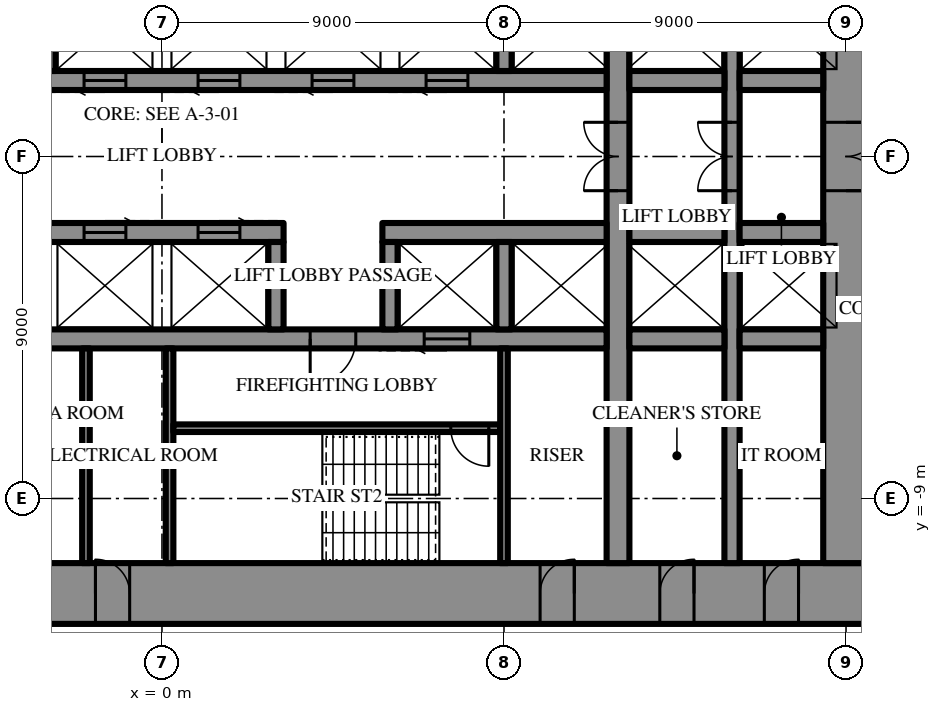
"""IFC4 building model, lengths in metres.
Left out: names, types, materials, properties, quantities, classifications, styles, units other than length and angle.
Written with IfcOpenShell. Run it as: python <this file> out.ifc"""

import sys

from ifc_helpers import new_model, si_unit, direction, frame, frame_2d, origin, place, context, subcontext, project, spatial, rectangle, extrude, element, fill, save


model = new_model("IFC4")
c1 = context("Model", 3, precision=1e-05, world=origin(), true_north=direction((0.0, 1.0)))
c2 = subcontext(c1, "Body", "Model", "MODEL_VIEW")
j1 = project(units=[si_unit("LENGTHUNIT", "METRE"), si_unit("PLANEANGLEUNIT", "RADIAN")], contexts=[c1])
p1 = place(None, origin())
s1 = spatial("IfcSite", under=j1, at=p1, CompositionType="ELEMENT")
p2 = place(p1, origin())
s2 = spatial("IfcBuilding", under=s1, at=p2, CompositionType="ELEMENT")
p3 = place(p2, frame((0.0, 0.0, 78.1)))
s3 = spatial("IfcBuildingStorey", under=s2, at=p3, CompositionType="ELEMENT", Elevation=78.1)
p4 = place(p3, frame((18.6, -11.5, 0.0), z_axis=(0.0, 0.0, 1.0), x_axis=(-1.0, 0.0, 0.0)))
e1 = element("IfcWall", 1, at=p4, inside=s3, PredefinedType="SHEAR", context=c2, shape_type="SweptSolid", body=[
    extrude(rectangle(XDim=37.2, YDim=1.6, at=frame_2d((18.6, 0.0))), origin(), (0.0, 0.0, 1.0), 4.2),
])
p5 = place(p4, frame((19.45, 0.0, 0.0)))
e2 = element("IfcOpeningElement", 2, at=p5, cuts=e1, PredefinedType="OPENING", context=c2, shape_type="SweptSolid", body=[
    extrude(rectangle(XDim=0.9, YDim=2.2, at=frame_2d((0.45, 1.1))), frame((0.0, 0.81, 0.0), z_axis=(0.0, -1.0, 0.0), x_axis=(1.0, 0.0, 0.0)), (0.0, 0.0, 1.0), 1.62),
])
p6 = place(p4, frame((22.45, 0.0, 0.0)))
e3 = element("IfcOpeningElement", 3, at=p6, cuts=e1, PredefinedType="OPENING", context=c2, shape_type="SweptSolid", body=[
    extrude(rectangle(XDim=0.9, YDim=2.2, at=frame_2d((0.45, 1.1))), frame((0.0, 0.81, 0.0), z_axis=(0.0, -1.0, 0.0), x_axis=(1.0, 0.0, 0.0)), (0.0, 0.0, 1.0), 1.62),
])
p7 = place(p4, frame((25.5, 0.0, 0.0)))
e4 = element("IfcOpeningElement", 4, at=p7, cuts=e1, PredefinedType="OPENING", context=c2, shape_type="SweptSolid", body=[
    extrude(rectangle(XDim=1.0, YDim=2.2, at=frame_2d((0.5, 1.1))), frame((0.0, 0.81, 0.0), z_axis=(0.0, -1.0, 0.0), x_axis=(1.0, 0.0, 0.0)), (0.0, 0.0, 1.0), 1.62),
])
p8 = place(p4, frame((1.85, 0.0, 0.0)))
e5 = element("IfcOpeningElement", 5, at=p8, cuts=e1, PredefinedType="OPENING", context=c2, shape_type="SweptSolid", body=[
    extrude(rectangle(XDim=0.9, YDim=2.2, at=frame_2d((0.45, 1.1))), frame((0.0, 0.81, 0.0), z_axis=(0.0, -1.0, 0.0), x_axis=(1.0, 0.0, 0.0)), (0.0, 0.0, 1.0), 1.62),
])
p9 = place(p4, frame((4.6, 0.0, 0.0)))
e6 = element("IfcOpeningElement", 6, at=p9, cuts=e1, PredefinedType="OPENING", context=c2, shape_type="SweptSolid", body=[
    extrude(rectangle(XDim=0.9, YDim=2.2, at=frame_2d((0.45, 1.1))), frame((0.0, 0.81, 0.0), z_axis=(0.0, -1.0, 0.0), x_axis=(1.0, 0.0, 0.0)), (0.0, 0.0, 1.0), 1.62),
])
p10 = place(p4, frame((7.75, 0.0, 0.0)))
e7 = element("IfcOpeningElement", 7, at=p10, cuts=e1, PredefinedType="OPENING", context=c2, shape_type="SweptSolid", body=[
    extrude(rectangle(XDim=0.9, YDim=2.2, at=frame_2d((0.45, 1.1))), frame((0.0, 0.81, 0.0), z_axis=(0.0, -1.0, 0.0), x_axis=(1.0, 0.0, 0.0)), (0.0, 0.0, 1.0), 1.62),
])
p11 = place(p4, frame((28.55, 0.0, 0.0)))
e8 = element("IfcOpeningElement", 8, at=p11, cuts=e1, PredefinedType="OPENING", context=c2, shape_type="SweptSolid", body=[
    extrude(rectangle(XDim=0.9, YDim=2.2, at=frame_2d((0.45, 1.1))), frame((0.0, 0.81, 0.0), z_axis=(0.0, -1.0, 0.0), x_axis=(1.0, 0.0, 0.0)), (0.0, 0.0, 1.0), 1.62),
])
p12 = place(p4, frame((31.7, 0.0, 0.0)))
e9 = element("IfcOpeningElement", 9, at=p12, cuts=e1, PredefinedType="OPENING", context=c2, shape_type="SweptSolid", body=[
    extrude(rectangle(XDim=0.9, YDim=2.2, at=frame_2d((0.45, 1.1))), frame((0.0, 0.81, 0.0), z_axis=(0.0, -1.0, 0.0), x_axis=(1.0, 0.0, 0.0)), (0.0, 0.0, 1.0), 1.62),
])
p13 = place(p4, frame((34.45, 0.0, 0.0)))
e10 = element("IfcOpeningElement", 10, at=p13, cuts=e1, PredefinedType="OPENING", context=c2, shape_type="SweptSolid", body=[
    extrude(rectangle(XDim=0.9, YDim=2.2, at=frame_2d((0.45, 1.1))), frame((0.0, 0.81, 0.0), z_axis=(0.0, -1.0, 0.0), x_axis=(1.0, 0.0, 0.0)), (0.0, 0.0, 1.0), 1.62),
])
p14 = place(p3, frame((18.0, -10.7, 0.0), z_axis=(0.0, 0.0, 1.0), x_axis=(0.0, 1.0, 0.0)))
e11 = element("IfcWall", 11, at=p14, inside=s3, PredefinedType="SHEAR", context=c2, shape_type="SweptSolid", body=[
    extrude(rectangle(XDim=21.4, YDim=1.2, at=frame_2d((10.7, 0.0))), origin(), (0.0, 0.0, 1.0), 4.2),
])
p15 = place(p14, frame((9.8, 0.0, 0.0)))
e12 = element("IfcOpeningElement", 12, at=p15, cuts=e11, PredefinedType="OPENING", context=c2, shape_type="SweptSolid", body=[
    extrude(rectangle(XDim=1.8, YDim=2.4, at=frame_2d((0.9, 1.2))), frame((0.0, 0.61, 0.0), z_axis=(0.0, -1.0, 0.0), x_axis=(1.0, 0.0, 0.0)), (0.0, 0.0, 1.0), 1.22),
])
p16 = place(p3, frame((12.0, -10.7, 0.0), z_axis=(0.0, 0.0, 1.0), x_axis=(0.0, 1.0, 0.0)))
e13 = element("IfcWall", 13, at=p16, inside=s3, PredefinedType="SHEAR", context=c2, shape_type="SweptSolid", body=[
    extrude(rectangle(XDim=21.4, YDim=0.6, at=frame_2d((10.7, 0.0))), origin(), (0.0, 0.0, 1.0), 4.2),
])
p17 = place(p16, frame((9.8, 0.0, 0.0)))
e14 = element("IfcOpeningElement", 14, at=p17, cuts=e13, PredefinedType="OPENING", context=c2, shape_type="SweptSolid", body=[
    extrude(rectangle(XDim=1.8, YDim=2.4, at=frame_2d((0.9, 1.2))), frame((0.0, 0.31, 0.0), z_axis=(0.0, -1.0, 0.0), x_axis=(1.0, 0.0, 0.0)), (0.0, 0.0, 1.0), 0.62),
])
p18 = place(p3, frame((15.0, -10.7, 0.0), z_axis=(0.0, 0.0, 1.0), x_axis=(0.0, 1.0, 0.0)))
e15 = element("IfcWall", 15, at=p18, inside=s3, PredefinedType="SHEAR", context=c2, shape_type="SweptSolid", body=[
    extrude(rectangle(XDim=21.4, YDim=0.4, at=frame_2d((10.7, 0.0))), origin(), (0.0, 0.0, 1.0), 4.2),
])
p19 = place(p18, frame((9.8, 0.0, 0.0)))
e16 = element("IfcOpeningElement", 16, at=p19, cuts=e15, PredefinedType="OPENING", context=c2, shape_type="SweptSolid", body=[
    extrude(rectangle(XDim=1.8, YDim=2.4, at=frame_2d((0.9, 1.2))), frame((0.0, 0.21, 0.0), z_axis=(0.0, -1.0, 0.0), x_axis=(1.0, 0.0, 0.0)), (0.0, 0.0, 1.0), 0.42),
])
p20 = place(p3, frame((-3.2, 2.0, 0.0), z_axis=(0.0, 0.0, 1.0), x_axis=(1.0, 0.0, 0.0)))
e17 = element("IfcWall", 17, at=p20, inside=s3, PredefinedType="SHEAR", context=c2, shape_type="SweptSolid", body=[
    extrude(rectangle(XDim=14.9, YDim=0.5, at=frame_2d((7.45, 0.0))), origin(), (0.0, 0.0, 1.0), 4.2),
])
p21 = place(p20, frame((1.15, 0.0, 0.0)))
e18 = element("IfcOpeningElement", 18, at=p21, cuts=e17, PredefinedType="OPENING", context=c2, shape_type="SweptSolid", body=[
    extrude(rectangle(XDim=1.1, YDim=2.2, at=frame_2d((0.55, 1.1))), frame((0.0, 0.26, 0.0), z_axis=(0.0, -1.0, 0.0), x_axis=(1.0, 0.0, 0.0)), (0.0, 0.0, 1.0), 0.52),
])
p22 = place(p20, frame((4.15, 0.0, 0.0)))
e19 = element("IfcOpeningElement", 19, at=p22, cuts=e17, PredefinedType="OPENING", context=c2, shape_type="SweptSolid", body=[
    extrude(rectangle(XDim=1.1, YDim=2.2, at=frame_2d((0.55, 1.1))), frame((0.0, 0.26, 0.0), z_axis=(0.0, -1.0, 0.0), x_axis=(1.0, 0.0, 0.0)), (0.0, 0.0, 1.0), 0.52),
])
p23 = place(p20, frame((7.15, 0.0, 0.0)))
e20 = element("IfcOpeningElement", 20, at=p23, cuts=e17, PredefinedType="OPENING", context=c2, shape_type="SweptSolid", body=[
    extrude(rectangle(XDim=1.1, YDim=2.2, at=frame_2d((0.55, 1.1))), frame((0.0, 0.26, 0.0), z_axis=(0.0, -1.0, 0.0), x_axis=(1.0, 0.0, 0.0)), (0.0, 0.0, 1.0), 0.52),
])
p24 = place(p20, frame((10.15, 0.0, 0.0)))
e21 = element("IfcOpeningElement", 21, at=p24, cuts=e17, PredefinedType="OPENING", context=c2, shape_type="SweptSolid", body=[
    extrude(rectangle(XDim=1.1, YDim=2.2, at=frame_2d((0.55, 1.1))), frame((0.0, 0.26, 0.0), z_axis=(0.0, -1.0, 0.0), x_axis=(1.0, 0.0, 0.0)), (0.0, 0.0, 1.0), 0.52),
])
p25 = place(p3, frame((12.3, 2.0, 0.0), z_axis=(0.0, 0.0, 1.0), x_axis=(1.0, 0.0, 0.0)))
e22 = element("IfcWall", 22, at=p25, inside=s3, PredefinedType="SHEAR", context=c2, shape_type="SweptSolid", body=[
    extrude(rectangle(XDim=2.5, YDim=0.5, at=frame_2d((1.25, 0.0))), origin(), (0.0, 0.0, 1.0), 4.2),
])
p26 = place(p3, frame((15.2, 2.0, 0.0), z_axis=(0.0, 0.0, 1.0), x_axis=(1.0, 0.0, 0.0)))
e23 = element("IfcWall", 23, at=p26, inside=s3, PredefinedType="SHEAR", context=c2, shape_type="SweptSolid", body=[
    extrude(rectangle(XDim=2.2, YDim=0.5, at=frame_2d((1.1, 0.0))), origin(), (0.0, 0.0, 1.0), 4.2),
])
for number, where, z_axis, x_axis in (
    (24, (-3.0, 2.25, 0.0), (0.0, 0.0, 1.0), (0.0, 1.0, 0.0)),
    (25, (9.0, 2.25, 0.0), (0.0, 0.0, 1.0), (0.0, 1.0, 0.0)),
):
    element("IfcWall", number, at=place(p3, frame(where, z_axis=z_axis, x_axis=x_axis)), inside=s3, PredefinedType="SHEAR", context=c2, shape_type="SweptSolid", body=[
        extrude(rectangle(XDim=2.3, YDim=0.4, at=frame_2d((1.15, 0.0))), origin(), (0.0, 0.0, 1.0), 4.2),
    ])
p27 = place(p3, frame((17.4, -2.0, 0.0), z_axis=(0.0, 0.0, 1.0), x_axis=(-1.0, 0.0, 0.0)))
e26 = element("IfcWall", 26, at=p27, inside=s3, PredefinedType="SHEAR", context=c2, shape_type="SweptSolid", body=[
    extrude(rectangle(XDim=2.2, YDim=0.5, at=frame_2d((1.1, 0.0))), origin(), (0.0, 0.0, 1.0), 4.2),
])
p28 = place(p3, frame((14.8, -2.0, 0.0), z_axis=(0.0, 0.0, 1.0), x_axis=(-1.0, 0.0, 0.0)))
e27 = element("IfcWall", 27, at=p28, inside=s3, PredefinedType="SHEAR", context=c2, shape_type="SweptSolid", body=[
    extrude(rectangle(XDim=2.5, YDim=0.5, at=frame_2d((1.25, 0.0))), origin(), (0.0, 0.0, 1.0), 4.2),
])
p29 = place(p3, frame((11.7, -2.0, 0.0), z_axis=(0.0, 0.0, 1.0), x_axis=(-1.0, 0.0, 0.0)))
e28 = element("IfcWall", 28, at=p29, inside=s3, PredefinedType="SHEAR", context=c2, shape_type="SweptSolid", body=[
    extrude(rectangle(XDim=5.9, YDim=0.5, at=frame_2d((2.95, 0.0))), origin(), (0.0, 0.0, 1.0), 4.2),
])
p30 = place(p3, frame((3.2, -2.0, 0.0), z_axis=(0.0, 0.0, 1.0), x_axis=(-1.0, 0.0, 0.0)))
e29 = element("IfcWall", 29, at=p30, inside=s3, PredefinedType="SHEAR", context=c2, shape_type="SweptSolid", body=[
    extrude(rectangle(XDim=14.9, YDim=0.5, at=frame_2d((7.45, 0.0))), origin(), (0.0, 0.0, 1.0), 4.2),
])
p31 = place(p30, frame((1.15, 0.0, 0.0)))
e30 = element("IfcOpeningElement", 30, at=p31, cuts=e29, PredefinedType="OPENING", context=c2, shape_type="SweptSolid", body=[
    extrude(rectangle(XDim=1.1, YDim=2.2, at=frame_2d((0.55, 1.1))), frame((0.0, 0.26, 0.0), z_axis=(0.0, -1.0, 0.0), x_axis=(1.0, 0.0, 0.0)), (0.0, 0.0, 1.0), 0.52),
])
p32 = place(p30, frame((4.15, 0.0, 0.0)))
e31 = element("IfcOpeningElement", 31, at=p32, cuts=e29, PredefinedType="OPENING", context=c2, shape_type="SweptSolid", body=[
    extrude(rectangle(XDim=1.1, YDim=2.2, at=frame_2d((0.55, 1.1))), frame((0.0, 0.26, 0.0), z_axis=(0.0, -1.0, 0.0), x_axis=(1.0, 0.0, 0.0)), (0.0, 0.0, 1.0), 0.52),
])
p33 = place(p30, frame((7.15, 0.0, 0.0)))
e32 = element("IfcOpeningElement", 32, at=p33, cuts=e29, PredefinedType="OPENING", context=c2, shape_type="SweptSolid", body=[
    extrude(rectangle(XDim=1.1, YDim=2.2, at=frame_2d((0.55, 1.1))), frame((0.0, 0.26, 0.0), z_axis=(0.0, -1.0, 0.0), x_axis=(1.0, 0.0, 0.0)), (0.0, 0.0, 1.0), 0.52),
])
p34 = place(p30, frame((10.15, 0.0, 0.0)))
e33 = element("IfcOpeningElement", 33, at=p34, cuts=e29, PredefinedType="OPENING", context=c2, shape_type="SweptSolid", body=[
    extrude(rectangle(XDim=1.1, YDim=2.2, at=frame_2d((0.55, 1.1))), frame((0.0, 0.26, 0.0), z_axis=(0.0, -1.0, 0.0), x_axis=(1.0, 0.0, 0.0)), (0.0, 0.0, 1.0), 0.52),
])
p35 = place(p3, frame((17.4, -4.8, 0.0), z_axis=(0.0, 0.0, 1.0), x_axis=(-1.0, 0.0, 0.0)))
e34 = element("IfcWall", 34, at=p35, inside=s3, PredefinedType="SHEAR", context=c2, shape_type="SweptSolid", body=[
    extrude(rectangle(XDim=2.2, YDim=0.5, at=frame_2d((1.1, 0.0))), origin(), (0.0, 0.0, 1.0), 4.2),
])
p36 = place(p3, frame((14.8, -4.8, 0.0), z_axis=(0.0, 0.0, 1.0), x_axis=(-1.0, 0.0, 0.0)))
e35 = element("IfcWall", 35, at=p36, inside=s3, PredefinedType="SHEAR", context=c2, shape_type="SweptSolid", body=[
    extrude(rectangle(XDim=2.5, YDim=0.5, at=frame_2d((1.25, 0.0))), origin(), (0.0, 0.0, 1.0), 4.2),
])
p37 = place(p3, frame((11.7, -4.8, 0.0), z_axis=(0.0, 0.0, 1.0), x_axis=(-1.0, 0.0, 0.0)))
e36 = element("IfcWall", 36, at=p37, inside=s3, PredefinedType="SHEAR", context=c2, shape_type="SweptSolid", body=[
    extrude(rectangle(XDim=23.4, YDim=0.5, at=frame_2d((11.7, 0.0))), origin(), (0.0, 0.0, 1.0), 4.2),
])
p38 = place(p37, frame((6.6, 0.0, 0.0)))
e37 = element("IfcOpeningElement", 37, at=p38, cuts=e36, PredefinedType="OPENING", context=c2, shape_type="SweptSolid", body=[
    extrude(rectangle(XDim=1.2, YDim=2.2, at=frame_2d((0.6, 1.1))), frame((0.0, 0.26, 0.0), z_axis=(0.0, -1.0, 0.0), x_axis=(1.0, 0.0, 0.0)), (0.0, 0.0, 1.0), 0.52),
])
p39 = place(p37, frame((3.6, 0.0, 0.0)))
e38 = element("IfcOpeningElement", 38, at=p39, cuts=e36, PredefinedType="OPENING", context=c2, shape_type="SweptSolid", body=[
    extrude(rectangle(XDim=1.2, YDim=2.2, at=frame_2d((0.6, 1.1))), frame((0.0, 0.26, 0.0), z_axis=(0.0, -1.0, 0.0), x_axis=(1.0, 0.0, 0.0)), (0.0, 0.0, 1.0), 0.52),
])
for number, where, z_axis, x_axis in (
    (39, (9.0, -2.25, 0.0), (0.0, 0.0, 1.0), (0.0, -1.0, 0.0)),
    (40, (6.0, -2.25, 0.0), (0.0, 0.0, 1.0), (0.0, -1.0, 0.0)),
    (41, (3.0, -2.25, 0.0), (0.0, 0.0, 1.0), (0.0, -1.0, 0.0)),
):
    element("IfcWall", number, at=place(p3, frame(where, z_axis=z_axis, x_axis=x_axis)), inside=s3, PredefinedType="SHEAR", context=c2, shape_type="SweptSolid", body=[
        extrude(rectangle(XDim=2.3, YDim=0.4, at=frame_2d((1.15, 0.0))), origin(), (0.0, 0.0, 1.0), 4.2),
    ])
p40 = place(p3, frame((0.2, -5.05, 0.0), z_axis=(0.0, 0.0, 1.0), x_axis=(0.0, -1.0, 0.0)))
e42 = element("IfcWall", 42, at=p40, inside=s3, PredefinedType="SHEAR", context=c2, shape_type="SweptSolid", body=[
    extrude(rectangle(XDim=5.65, YDim=0.2, at=frame_2d((2.825, 0.0))), origin(), (0.0, 0.0, 1.0), 4.2),
])
p41 = place(p3, frame((8.9, -7.15, 0.0), z_axis=(0.0, 0.0, 1.0), x_axis=(-1.0, 0.0, 0.0)))
e43 = element("IfcWall", 43, at=p41, inside=s3, PredefinedType="SHEAR", context=c2, shape_type="SweptSolid", body=[
    extrude(rectangle(XDim=8.6, YDim=0.2, at=frame_2d((4.3, 0.0))), origin(), (0.0, 0.0, 1.0), 4.2),
])
p42 = place(p41, frame((0.3, 0.0, 0.0)))
e44 = element("IfcOpeningElement", 44, at=p42, cuts=e43, PredefinedType="OPENING", context=c2, shape_type="SweptSolid", body=[
    extrude(rectangle(XDim=1.0, YDim=2.2, at=frame_2d((0.5, 1.1))), frame((0.0, 0.11, 0.0), z_axis=(0.0, -1.0, 0.0), x_axis=(1.0, 0.0, 0.0)), (0.0, 0.0, 1.0), 0.22),
])
for number, where, z_axis, x_axis in (
    (45, (9.0, -5.05, 0.0), (0.0, 0.0, 1.0), (0.0, -1.0, 0.0)),
    (46, (-2.0, -5.05, 0.0), (0.0, 0.0, 1.0), (0.0, -1.0, 0.0)),
):
    element("IfcWall", number, at=place(p3, frame(where, z_axis=z_axis, x_axis=x_axis)), inside=s3, PredefinedType="PARTITIONING", context=c2, shape_type="SweptSolid", body=[
        extrude(rectangle(XDim=5.65, YDim=0.2, at=frame_2d((2.825, 0.0))), origin(), (0.0, 0.0, 1.0), 4.0),
    ])
p43 = place(p15, frame((1.8, 0.0, 0.0), z_axis=(0.0, 0.0, 1.0), x_axis=(-1.0, 0.0, 0.0)))
e47 = element("IfcDoor", 47, at=p43, inside=s3, OperationType="DOUBLE_DOOR_SINGLE_SWING", PredefinedType="DOOR", context=c2, shape_type="SweptSolid", body=[
    extrude(rectangle(XDim=1.8, YDim=2.4, at=frame_2d((0.9, 1.2))), frame((0.0, 0.025, 0.0), z_axis=(0.0, -1.0, 0.0), x_axis=(1.0, 0.0, 0.0)), (0.0, 0.0, 1.0), 0.05),
])
fill(e12, e47)
p44 = place(p38, origin())
e48 = element("IfcDoor", 48, at=p44, inside=s3, OperationType="SINGLE_SWING_LEFT", PredefinedType="DOOR", context=c2, shape_type="SweptSolid", body=[
    extrude(rectangle(XDim=1.2, YDim=2.2, at=frame_2d((0.6, 1.1))), frame((0.0, 0.025, 0.0), z_axis=(0.0, -1.0, 0.0), x_axis=(1.0, 0.0, 0.0)), (0.0, 0.0, 1.0), 0.05),
])
fill(e37, e48)
p45 = place(p42, origin())
e49 = element("IfcDoor", 49, at=p45, inside=s3, OperationType="SINGLE_SWING_RIGHT", PredefinedType="DOOR", context=c2, shape_type="SweptSolid", body=[
    extrude(rectangle(XDim=1.0, YDim=2.2, at=frame_2d((0.5, 1.1))), frame((0.0, 0.025, 0.0), z_axis=(0.0, -1.0, 0.0), x_axis=(1.0, 0.0, 0.0)), (0.0, 0.0, 1.0), 0.05),
])
fill(e44, e49)
p46 = place(p5, frame((0.9, 0.0, 0.0), z_axis=(0.0, 0.0, 1.0), x_axis=(-1.0, 0.0, 0.0)))
e50 = element("IfcDoor", 50, at=p46, inside=s3, OperationType="SINGLE_SWING_RIGHT", PredefinedType="DOOR", context=c2, shape_type="SweptSolid", body=[
    extrude(rectangle(XDim=0.9, YDim=2.2, at=frame_2d((0.45, 1.1))), frame((0.0, 0.025, 0.0), z_axis=(0.0, -1.0, 0.0), x_axis=(1.0, 0.0, 0.0)), (0.0, 0.0, 1.0), 0.05),
])
fill(e2, e50)
p47 = place(p8, frame((0.9, 0.0, 0.0), z_axis=(0.0, 0.0, 1.0), x_axis=(-1.0, 0.0, 0.0)))
e51 = element("IfcDoor", 51, at=p47, inside=s3, OperationType="SINGLE_SWING_LEFT", PredefinedType="DOOR", context=c2, shape_type="SweptSolid", body=[
    extrude(rectangle(XDim=0.9, YDim=2.2, at=frame_2d((0.45, 1.1))), frame((0.0, 0.025, 0.0), z_axis=(0.0, -1.0, 0.0), x_axis=(1.0, 0.0, 0.0)), (0.0, 0.0, 1.0), 0.05),
])
fill(e5, e51)
p48 = place(p9, frame((0.9, 0.0, 0.0), z_axis=(0.0, 0.0, 1.0), x_axis=(-1.0, 0.0, 0.0)))
e52 = element("IfcDoor", 52, at=p48, inside=s3, OperationType="SINGLE_SWING_LEFT", PredefinedType="DOOR", context=c2, shape_type="SweptSolid", body=[
    extrude(rectangle(XDim=0.9, YDim=2.2, at=frame_2d((0.45, 1.1))), frame((0.0, 0.025, 0.0), z_axis=(0.0, -1.0, 0.0), x_axis=(1.0, 0.0, 0.0)), (0.0, 0.0, 1.0), 0.05),
])
fill(e6, e52)
p49 = place(p10, frame((0.9, 0.0, 0.0), z_axis=(0.0, 0.0, 1.0), x_axis=(-1.0, 0.0, 0.0)))
e53 = element("IfcDoor", 53, at=p49, inside=s3, OperationType="SINGLE_SWING_LEFT", PredefinedType="DOOR", context=c2, shape_type="SweptSolid", body=[
    extrude(rectangle(XDim=0.9, YDim=2.2, at=frame_2d((0.45, 1.1))), frame((0.0, 0.025, 0.0), z_axis=(0.0, -1.0, 0.0), x_axis=(1.0, 0.0, 0.0)), (0.0, 0.0, 1.0), 0.05),
])
fill(e7, e53)
p50 = place(p17, origin())
e54 = element("IfcDoor", 54, at=p50, inside=s3, OperationType="DOUBLE_DOOR_SINGLE_SWING", PredefinedType="DOOR", context=c2, shape_type="SweptSolid", body=[
    extrude(rectangle(XDim=1.8, YDim=2.4, at=frame_2d((0.9, 1.2))), frame((0.0, 0.025, 0.0), z_axis=(0.0, -1.0, 0.0), x_axis=(1.0, 0.0, 0.0)), (0.0, 0.0, 1.0), 0.05),
])
fill(e14, e54)
p51 = place(p19, origin())
e55 = element("IfcDoor", 55, at=p51, inside=s3, OperationType="DOUBLE_DOOR_SINGLE_SWING", PredefinedType="DOOR", context=c2, shape_type="SweptSolid", body=[
    extrude(rectangle(XDim=1.8, YDim=2.4, at=frame_2d((0.9, 1.2))), frame((0.0, 0.025, 0.0), z_axis=(0.0, -1.0, 0.0), x_axis=(1.0, 0.0, 0.0)), (0.0, 0.0, 1.0), 0.05),
])
fill(e16, e55)
p52 = place(p21, frame((1.1, 0.0, 0.0), z_axis=(0.0, 0.0, 1.0), x_axis=(-1.0, 0.0, 0.0)))
e56 = element("IfcDoor", 56, at=p52, inside=s3, OperationType="SLIDING_TO_LEFT", PredefinedType="DOOR", context=c2, shape_type="SweptSolid", body=[
    extrude(rectangle(XDim=1.1, YDim=2.2, at=frame_2d((0.55, 1.1))), frame((0.0, 0.025, 0.0), z_axis=(0.0, -1.0, 0.0), x_axis=(1.0, 0.0, 0.0)), (0.0, 0.0, 1.0), 0.05),
])
fill(e18, e56)
p53 = place(p22, frame((1.1, 0.0, 0.0), z_axis=(0.0, 0.0, 1.0), x_axis=(-1.0, 0.0, 0.0)))
e57 = element("IfcDoor", 57, at=p53, inside=s3, OperationType="SLIDING_TO_LEFT", PredefinedType="DOOR", context=c2, shape_type="SweptSolid", body=[
    extrude(rectangle(XDim=1.1, YDim=2.2, at=frame_2d((0.55, 1.1))), frame((0.0, 0.025, 0.0), z_axis=(0.0, -1.0, 0.0), x_axis=(1.0, 0.0, 0.0)), (0.0, 0.0, 1.0), 0.05),
])
fill(e19, e57)
p54 = place(p23, frame((1.1, 0.0, 0.0), z_axis=(0.0, 0.0, 1.0), x_axis=(-1.0, 0.0, 0.0)))
e58 = element("IfcDoor", 58, at=p54, inside=s3, OperationType="SLIDING_TO_LEFT", PredefinedType="DOOR", context=c2, shape_type="SweptSolid", body=[
    extrude(rectangle(XDim=1.1, YDim=2.2, at=frame_2d((0.55, 1.1))), frame((0.0, 0.025, 0.0), z_axis=(0.0, -1.0, 0.0), x_axis=(1.0, 0.0, 0.0)), (0.0, 0.0, 1.0), 0.05),
])
fill(e20, e58)
p55 = place(p24, frame((1.1, 0.0, 0.0), z_axis=(0.0, 0.0, 1.0), x_axis=(-1.0, 0.0, 0.0)))
e59 = element("IfcDoor", 59, at=p55, inside=s3, OperationType="SLIDING_TO_LEFT", PredefinedType="DOOR", context=c2, shape_type="SweptSolid", body=[
    extrude(rectangle(XDim=1.1, YDim=2.2, at=frame_2d((0.55, 1.1))), frame((0.0, 0.025, 0.0), z_axis=(0.0, -1.0, 0.0), x_axis=(1.0, 0.0, 0.0)), (0.0, 0.0, 1.0), 0.05),
])
fill(e21, e59)
p56 = place(p39, origin())
e60 = element("IfcDoor", 60, at=p56, inside=s3, OperationType="SLIDING_TO_LEFT", PredefinedType="DOOR", context=c2, shape_type="SweptSolid", body=[
    extrude(rectangle(XDim=1.2, YDim=2.2, at=frame_2d((0.6, 1.1))), frame((0.0, 0.025, 0.0), z_axis=(0.0, -1.0, 0.0), x_axis=(1.0, 0.0, 0.0)), (0.0, 0.0, 1.0), 0.05),
])
fill(e38, e60)
p57 = place(p31, frame((1.1, 0.0, 0.0), z_axis=(0.0, 0.0, 1.0), x_axis=(-1.0, 0.0, 0.0)))
e61 = element("IfcDoor", 61, at=p57, inside=s3, OperationType="SLIDING_TO_LEFT", PredefinedType="DOOR", context=c2, shape_type="SweptSolid", body=[
    extrude(rectangle(XDim=1.1, YDim=2.2, at=frame_2d((0.55, 1.1))), frame((0.0, 0.025, 0.0), z_axis=(0.0, -1.0, 0.0), x_axis=(1.0, 0.0, 0.0)), (0.0, 0.0, 1.0), 0.05),
])
fill(e30, e61)
p58 = place(p32, frame((1.1, 0.0, 0.0), z_axis=(0.0, 0.0, 1.0), x_axis=(-1.0, 0.0, 0.0)))
e62 = element("IfcDoor", 62, at=p58, inside=s3, OperationType="SLIDING_TO_LEFT", PredefinedType="DOOR", context=c2, shape_type="SweptSolid", body=[
    extrude(rectangle(XDim=1.1, YDim=2.2, at=frame_2d((0.55, 1.1))), frame((0.0, 0.025, 0.0), z_axis=(0.0, -1.0, 0.0), x_axis=(1.0, 0.0, 0.0)), (0.0, 0.0, 1.0), 0.05),
])
fill(e31, e62)
save(model, sys.argv[1])
